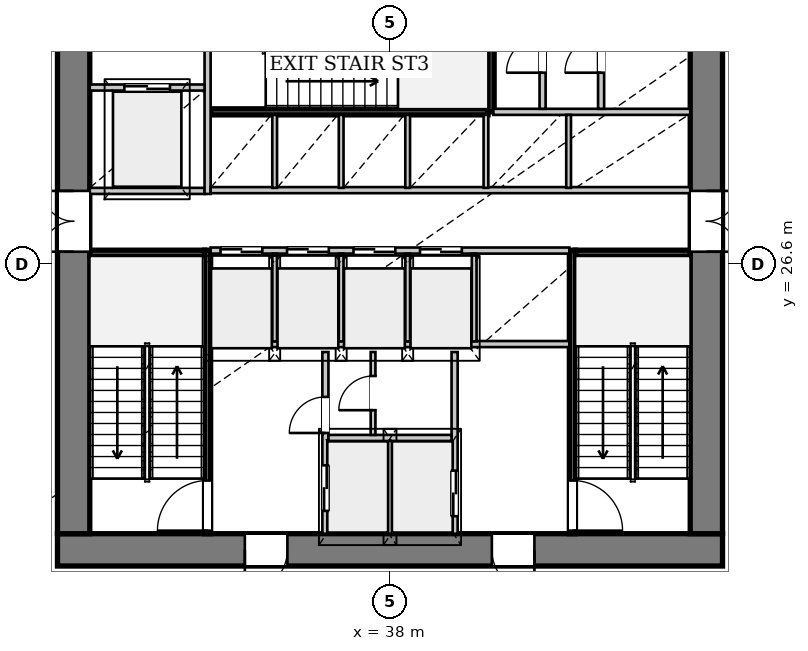
"""IFC4 building model, lengths in metres.
Left out: names, types, materials, properties, quantities, classifications, styles, units other than length and angle.
Written with IfcOpenShell. Run it as: python <this file> out.ifc"""

import sys

from ifc_helpers import new_model, si_unit, direction, frame, frame_2d, origin, place, context, subcontext, project, spatial, rectangle, extrude, source, transform, mapped, element, fill, save


model = new_model("IFC4")
c1 = context("Model", 3, precision=1e-05, world=origin(), true_north=direction((0.0, 1.0)))
c2 = subcontext(c1, "Body", "Model", "MODEL_VIEW")
j1 = project(units=[si_unit("LENGTHUNIT", "METRE"), si_unit("PLANEANGLEUNIT", "RADIAN")], contexts=[c1])
p1 = place(None, origin())
s1 = spatial("IfcSite", under=j1, at=p1, CompositionType="ELEMENT")
p2 = place(p1, origin())
s2 = spatial("IfcBuilding", under=s1, at=p2, CompositionType="ELEMENT")
p3 = place(p2, frame((0.0, 0.0, 15.6)))
s3 = spatial("IfcBuildingStorey", under=s2, at=p3, CompositionType="ELEMENT", Elevation=15.6)
p4 = place(p3, frame((46.75, 19.075, 0.0), z_axis=(0.0, 0.0, 1.0), x_axis=(-1.0, 0.0, 0.0)))
e1 = element("IfcWall", 1, at=p4, inside=s3, PredefinedType="SHEAR", context=c2, shape_type="SweptSolid", body=[
    extrude(rectangle(XDim=17.5, YDim=0.85, at=frame_2d((8.75, 0.0))), origin(), (0.0, 0.0, 1.0), 4.18),
])
p5 = place(p4, frame((4.95, 0.0, 0.0)))
e2 = element("IfcOpeningElement", 2, at=p5, cuts=e1, PredefinedType="OPENING", context=c2, shape_type="SweptSolid", body=[
    extrude(rectangle(XDim=1.12, YDim=2.25, at=frame_2d((0.56, 1.125))), frame((0.0, 0.435, 0.0), z_axis=(0.0, -1.0, 0.0), x_axis=(1.0, 0.0, 0.0)), (0.0, 0.0, 1.0), 0.87),
])
p6 = place(p4, frame((11.45, 0.0, 0.0)))
e3 = element("IfcOpeningElement", 3, at=p6, cuts=e1, PredefinedType="OPENING", context=c2, shape_type="SweptSolid", body=[
    extrude(rectangle(XDim=1.12, YDim=2.25, at=frame_2d((0.56, 1.125))), frame((0.0, 0.435, 0.0), z_axis=(0.0, -1.0, 0.0), x_axis=(1.0, 0.0, 0.0)), (0.0, 0.0, 1.0), 0.87),
])
p7 = place(p3, frame((29.675, 19.5, 0.0), z_axis=(0.0, 0.0, 1.0), x_axis=(0.0, 1.0, 0.0)))
e4 = element("IfcWall", 4, at=p7, inside=s3, PredefinedType="SHEAR", context=c2, shape_type="SweptSolid", body=[
    extrude(rectangle(XDim=14.2, YDim=0.85, at=frame_2d((7.1, 0.0))), origin(), (0.0, 0.0, 1.0), 4.18),
])
p8 = place(p7, frame((7.42, 0.0, 0.0)))
e5 = element("IfcOpeningElement", 5, at=p8, cuts=e4, PredefinedType="OPENING", context=c2, shape_type="SweptSolid", body=[
    extrude(rectangle(XDim=1.6, YDim=2.2, at=frame_2d((0.8, 1.1))), frame((0.0, 0.435, 0.0), z_axis=(0.0, -1.0, 0.0), x_axis=(1.0, 0.0, 0.0)), (0.0, 0.0, 1.0), 0.87),
])
p9 = place(p3, frame((46.325, 33.7, 0.0), z_axis=(0.0, 0.0, 1.0), x_axis=(0.0, -1.0, 0.0)))
e6 = element("IfcWall", 6, at=p9, inside=s3, PredefinedType="SHEAR", context=c2, shape_type="SweptSolid", body=[
    extrude(rectangle(XDim=14.2, YDim=0.85, at=frame_2d((7.1, 0.0))), origin(), (0.0, 0.0, 1.0), 4.18),
])
p10 = place(p9, frame((5.18, 0.0, 0.0)))
e7 = element("IfcOpeningElement", 7, at=p10, cuts=e6, PredefinedType="OPENING", context=c2, shape_type="SweptSolid", body=[
    extrude(rectangle(XDim=1.6, YDim=2.2, at=frame_2d((0.8, 1.1))), frame((0.0, 0.435, 0.0), z_axis=(0.0, -1.0, 0.0), x_axis=(1.0, 0.0, 0.0)), (0.0, 0.0, 1.0), 0.87),
])
p11 = place(p3, frame((33.2, 19.5, 0.0), z_axis=(0.0, 0.0, 1.0), x_axis=(0.0, 1.0, 0.0)))
e8 = element("IfcWall", 8, at=p11, inside=s3, PredefinedType="PARTITIONING", context=c2, shape_type="SweptSolid", body=[
    extrude(rectangle(XDim=7.46, YDim=0.16, at=frame_2d((3.73, 0.0))), origin(), (0.0, 0.0, 1.0), 4.18),
])
p12 = place(p11, frame((0.08, 0.0, 0.0)))
e9 = element("IfcOpeningElement", 9, at=p12, cuts=e8, PredefinedType="OPENING", context=c2, shape_type="SweptSolid", body=[
    extrude(rectangle(XDim=1.32, YDim=2.2, at=frame_2d((0.66, 1.1))), frame((0.0, 0.09, 0.0), z_axis=(0.0, -1.0, 0.0), x_axis=(1.0, 0.0, 0.0)), (0.0, 0.0, 1.0), 0.18),
])
p13 = place(p3, frame((30.1, 26.88, 0.0), z_axis=(0.0, 0.0, 1.0), x_axis=(1.0, 0.0, 0.0)))
e10 = element("IfcWall", 10, at=p13, inside=s3, PredefinedType="PARTITIONING", context=c2, shape_type="SweptSolid", body=[
    extrude(rectangle(XDim=3.02, YDim=0.16, at=frame_2d((1.51, 0.0))), origin(), (0.0, 0.0, 1.0), 4.18),
])
p14 = place(p3, frame((42.8, 26.96, 0.0), z_axis=(0.0, 0.0, 1.0), x_axis=(0.0, -1.0, 0.0)))
e11 = element("IfcWall", 11, at=p14, inside=s3, PredefinedType="PARTITIONING", context=c2, shape_type="SweptSolid", body=[
    extrude(rectangle(XDim=7.46, YDim=0.16, at=frame_2d((3.73, 0.0))), origin(), (0.0, 0.0, 1.0), 4.18),
])
p15 = place(p14, frame((6.06, 0.0, 0.0)))
e12 = element("IfcOpeningElement", 12, at=p15, cuts=e11, PredefinedType="OPENING", context=c2, shape_type="SweptSolid", body=[
    extrude(rectangle(XDim=1.32, YDim=2.2, at=frame_2d((0.66, 1.1))), frame((0.0, 0.09, 0.0), z_axis=(0.0, -1.0, 0.0), x_axis=(1.0, 0.0, 0.0)), (0.0, 0.0, 1.0), 0.18),
])
p16 = place(p3, frame((42.88, 26.88, 0.0), z_axis=(0.0, 0.0, 1.0), x_axis=(1.0, 0.0, 0.0)))
e13 = element("IfcWall", 13, at=p16, inside=s3, PredefinedType="PARTITIONING", context=c2, shape_type="SweptSolid", body=[
    extrude(rectangle(XDim=3.02, YDim=0.16, at=frame_2d((1.51, 0.0))), origin(), (0.0, 0.0, 1.0), 4.18),
])
p17 = place(p3, frame((33.28, 30.6, 0.0), z_axis=(0.0, 0.0, 1.0), x_axis=(1.0, 0.0, 0.0)))
e14 = element("IfcWall", 14, at=p17, inside=s3, PredefinedType="PARTITIONING", context=c2, shape_type="SweptSolid", body=[
    extrude(rectangle(XDim=7.3, YDim=0.16, at=frame_2d((3.65, 0.0))), origin(), (0.0, 0.0, 1.0), 4.18),
])
p18 = place(p3, frame((40.66, 30.6, 0.0), z_axis=(0.0, 0.0, 1.0), x_axis=(0.0, 1.0, 0.0)))
e15 = element("IfcWall", 15, at=p18, inside=s3, PredefinedType="PARTITIONING", context=c2, shape_type="SweptSolid", body=[
    extrude(rectangle(XDim=3.1, YDim=0.16, at=frame_2d((1.55, 0.0))), origin(), (0.0, 0.0, 1.0), 4.18),
])
p19 = place(p3, frame((36.3, 19.5, 0.0), z_axis=(0.0, 0.0, 1.0), x_axis=(0.0, 1.0, 0.0)))
e16 = element("IfcWall", 16, at=p19, inside=s3, PredefinedType="PARTITIONING", context=c2, shape_type="SweptSolid", body=[
    extrude(rectangle(XDim=4.78, YDim=0.16, at=frame_2d((2.39, 0.0))), origin(), (0.0, 0.0, 1.0), 4.18),
])
p20 = place(p19, frame((0.6, 0.0, 0.0)))
e17 = element("IfcOpeningElement", 17, at=p20, cuts=e16, PredefinedType="OPENING", context=c2, shape_type="SweptSolid", body=[
    extrude(rectangle(XDim=1.2, YDim=2.2, at=frame_2d((0.6, 1.1))), frame((0.0, 0.09, 0.0), z_axis=(0.0, -1.0, 0.0), x_axis=(1.0, 0.0, 0.0)), (0.0, 0.0, 1.0), 0.18),
])
p21 = place(p19, frame((2.65, 0.0, 0.0)))
e18 = element("IfcOpeningElement", 18, at=p21, cuts=e16, PredefinedType="OPENING", context=c2, shape_type="SweptSolid", body=[
    extrude(rectangle(XDim=0.95, YDim=2.1, at=frame_2d((0.475, 1.05))), frame((0.0, 0.09, 0.0), z_axis=(0.0, -1.0, 0.0), x_axis=(1.0, 0.0, 0.0)), (0.0, 0.0, 1.0), 0.18),
])
p22 = place(p3, frame((39.7, 24.28, 0.0), z_axis=(0.0, 0.0, 1.0), x_axis=(0.0, -1.0, 0.0)))
e19 = element("IfcWall", 19, at=p22, inside=s3, PredefinedType="PARTITIONING", context=c2, shape_type="SweptSolid", body=[
    extrude(rectangle(XDim=4.78, YDim=0.16, at=frame_2d((2.39, 0.0))), origin(), (0.0, 0.0, 1.0), 4.18),
])
p23 = place(p22, frame((3.12, 0.0, 0.0)))
e20 = element("IfcOpeningElement", 20, at=p23, cuts=e19, PredefinedType="OPENING", context=c2, shape_type="SweptSolid", body=[
    extrude(rectangle(XDim=1.2, YDim=2.2, at=frame_2d((0.6, 1.1))), frame((0.0, 0.09, 0.0), z_axis=(0.0, -1.0, 0.0), x_axis=(1.0, 0.0, 0.0)), (0.0, 0.0, 1.0), 0.18),
])
p24 = place(p3, frame((38.0, 19.5, 0.0), z_axis=(0.0, 0.0, 1.0), x_axis=(0.0, 1.0, 0.0)))
e21 = element("IfcWall", 21, at=p24, inside=s3, PredefinedType="PARTITIONING", context=c2, shape_type="SweptSolid", body=[
    extrude(rectangle(XDim=2.46, YDim=0.125, at=frame_2d((1.23, 0.0))), origin(), (0.0, 0.0, 1.0), 4.18),
])
p25 = place(p3, frame((36.38, 22.02, 0.0), z_axis=(0.0, 0.0, 1.0), x_axis=(1.0, 0.0, 0.0)))
e22 = element("IfcWall", 22, at=p25, inside=s3, PredefinedType="PARTITIONING", context=c2, shape_type="SweptSolid", body=[
    extrude(rectangle(XDim=3.24, YDim=0.16, at=frame_2d((1.62, 0.0))), origin(), (0.0, 0.0, 1.0), 4.18),
])
p26 = place(p3, frame((33.28, 24.49, 0.0), z_axis=(0.0, 0.0, 1.0), x_axis=(1.0, 0.0, 0.0)))
e23 = element("IfcWall", 23, at=p26, inside=s3, PredefinedType="PARTITIONING", context=c2, shape_type="SweptSolid", body=[
    extrude(rectangle(XDim=9.44, YDim=0.16, at=frame_2d((4.72, 0.0))), origin(), (0.0, 0.0, 1.0), 4.18),
])
p27 = place(p3, frame((37.554, 22.1, 0.0), z_axis=(0.0, 0.0, 1.0), x_axis=(0.0, 1.0, 0.0)))
e24 = element("IfcWall", 24, at=p27, inside=s3, PredefinedType="PARTITIONING", context=c2, shape_type="SweptSolid", body=[
    extrude(rectangle(XDim=2.18, YDim=0.125, at=frame_2d((1.09, 0.0))), origin(), (0.0, 0.0, 1.0), 4.18),
])
p28 = place(p27, frame((0.65, 0.0, 0.0)))
e25 = element("IfcOpeningElement", 25, at=p28, cuts=e24, PredefinedType="OPENING", context=c2, shape_type="SweptSolid", body=[
    extrude(rectangle(XDim=0.9, YDim=2.1, at=frame_2d((0.45, 1.05))), frame((0.0, 0.073, 0.0), z_axis=(0.0, -1.0, 0.0), x_axis=(1.0, 0.0, 0.0)), (0.0, 0.0, 1.0), 0.145),
])
p29 = place(p3, frame((30.1, 28.52, 0.0), z_axis=(0.0, 0.0, 1.0), x_axis=(1.0, 0.0, 0.0)))
e26 = element("IfcWall", 26, at=p29, inside=s3, PredefinedType="PARTITIONING", context=c2, shape_type="SweptSolid", body=[
    extrude(rectangle(XDim=3.02, YDim=0.16, at=frame_2d((1.51, 0.0))), origin(), (0.0, 0.0, 1.0), 4.18),
])
p30 = place(p3, frame((33.2, 28.44, 0.0), z_axis=(0.0, 0.0, 1.0), x_axis=(0.0, 1.0, 0.0)))
e27 = element("IfcWall", 27, at=p30, inside=s3, PredefinedType="PARTITIONING", context=c2, shape_type="SweptSolid", body=[
    extrude(rectangle(XDim=5.26, YDim=0.16, at=frame_2d((2.63, 0.0))), origin(), (0.0, 0.0, 1.0), 4.18),
])
p31 = place(p3, frame((30.1, 31.24, 0.0), z_axis=(0.0, 0.0, 1.0), x_axis=(1.0, 0.0, 0.0)))
e28 = element("IfcWall", 28, at=p31, inside=s3, PredefinedType="PARTITIONING", context=c2, shape_type="SweptSolid", body=[
    extrude(rectangle(XDim=3.02, YDim=0.16, at=frame_2d((1.51, 0.0))), origin(), (0.0, 0.0, 1.0), 4.18),
])
p32 = place(p31, frame((0.91, 0.0, 0.0)))
e29 = element("IfcOpeningElement", 29, at=p32, cuts=e28, PredefinedType="OPENING", context=c2, shape_type="SweptSolid", body=[
    extrude(rectangle(XDim=1.2, YDim=2.2, at=frame_2d((0.6, 1.1))), frame((0.0, 0.09, 0.0), z_axis=(0.0, -1.0, 0.0), x_axis=(1.0, 0.0, 0.0)), (0.0, 0.0, 1.0), 0.18),
])
p33 = place(p3, frame((33.28, 26.95, 0.0), z_axis=(0.0, 0.0, 1.0), x_axis=(1.0, 0.0, 0.0)))
e30 = element("IfcWall", 30, at=p33, inside=s3, PredefinedType="PARTITIONING", context=c2, shape_type="SweptSolid", body=[
    extrude(rectangle(XDim=9.44, YDim=0.16, at=frame_2d((4.72, 0.0))), origin(), (0.0, 0.0, 1.0), 4.18),
])
p34 = place(p33, frame((0.26, 0.0, 0.0)))
e31 = element("IfcOpeningElement", 31, at=p34, cuts=e30, PredefinedType="OPENING", context=c2, shape_type="SweptSolid", body=[
    extrude(rectangle(XDim=1.1, YDim=2.2, at=frame_2d((0.55, 1.1))), frame((0.0, 0.09, 0.0), z_axis=(0.0, -1.0, 0.0), x_axis=(1.0, 0.0, 0.0)), (0.0, 0.0, 1.0), 0.18),
])
p35 = place(p33, frame((2.01, 0.0, 0.0)))
e32 = element("IfcOpeningElement", 32, at=p35, cuts=e30, PredefinedType="OPENING", context=c2, shape_type="SweptSolid", body=[
    extrude(rectangle(XDim=1.1, YDim=2.2, at=frame_2d((0.55, 1.1))), frame((0.0, 0.09, 0.0), z_axis=(0.0, -1.0, 0.0), x_axis=(1.0, 0.0, 0.0)), (0.0, 0.0, 1.0), 0.18),
])
p36 = place(p33, frame((3.76, 0.0, 0.0)))
e33 = element("IfcOpeningElement", 33, at=p36, cuts=e30, PredefinedType="OPENING", context=c2, shape_type="SweptSolid", body=[
    extrude(rectangle(XDim=1.1, YDim=2.2, at=frame_2d((0.55, 1.1))), frame((0.0, 0.09, 0.0), z_axis=(0.0, -1.0, 0.0), x_axis=(1.0, 0.0, 0.0)), (0.0, 0.0, 1.0), 0.18),
])
p37 = place(p33, frame((5.51, 0.0, 0.0)))
e34 = element("IfcOpeningElement", 34, at=p37, cuts=e30, PredefinedType="OPENING", context=c2, shape_type="SweptSolid", body=[
    extrude(rectangle(XDim=1.1, YDim=2.2, at=frame_2d((0.55, 1.1))), frame((0.0, 0.09, 0.0), z_axis=(0.0, -1.0, 0.0), x_axis=(1.0, 0.0, 0.0)), (0.0, 0.0, 1.0), 0.18),
])
for number, where, z_axis, x_axis in (
    (35, (34.965, 24.56, 0.0), (0.0, 0.0, 1.0), (0.0, 1.0, 0.0)),
    (36, (36.715, 24.56, 0.0), (0.0, 0.0, 1.0), (0.0, 1.0, 0.0)),
    (37, (38.465, 24.56, 0.0), (0.0, 0.0, 1.0), (0.0, 1.0, 0.0)),
    (38, (40.215, 24.56, 0.0), (0.0, 0.0, 1.0), (0.0, 1.0, 0.0)),
):
    element("IfcWall", number, at=place(p3, frame(where, z_axis=z_axis, x_axis=x_axis)), inside=s3, PredefinedType="PARTITIONING", context=c2, shape_type="SweptSolid", body=[
        extrude(rectangle(XDim=2.31, YDim=0.125, at=frame_2d((1.155, 0.0))), origin(), (0.0, 0.0, 1.0), 4.18),
    ])
p38 = place(p3, frame((33.28, 28.54, 0.0), z_axis=(0.0, 0.0, 1.0), x_axis=(1.0, 0.0, 0.0)))
e39 = element("IfcWall", 39, at=p38, inside=s3, PredefinedType="PARTITIONING", context=c2, shape_type="SweptSolid", body=[
    extrude(rectangle(XDim=12.62, YDim=0.16, at=frame_2d((6.31, 0.0))), origin(), (0.0, 0.0, 1.0), 4.18),
])
p39 = place(p3, frame((40.72, 30.6, 0.0), z_axis=(0.0, 0.0, 1.0), x_axis=(1.0, 0.0, 0.0)))
e40 = element("IfcWall", 40, at=p39, inside=s3, PredefinedType="PARTITIONING", context=c2, shape_type="SweptSolid", body=[
    extrude(rectangle(XDim=5.18, YDim=0.16, at=frame_2d((2.59, 0.0))), origin(), (0.0, 0.0, 1.0), 4.18),
])
for number, where, z_axis, x_axis in (
    (41, (34.965, 28.6, 0.0), (0.0, 0.0, 1.0), (0.0, 1.0, 0.0)),
    (42, (36.715, 28.6, 0.0), (0.0, 0.0, 1.0), (0.0, 1.0, 0.0)),
    (43, (38.465, 28.6, 0.0), (0.0, 0.0, 1.0), (0.0, 1.0, 0.0)),
    (44, (40.525, 28.6, 0.0), (0.0, 0.0, 1.0), (0.0, 1.0, 0.0)),
    (45, (42.7, 28.6, 0.0), (0.0, 0.0, 1.0), (0.0, 1.0, 0.0)),
):
    element("IfcWall", number, at=place(p3, frame(where, z_axis=z_axis, x_axis=x_axis)), inside=s3, PredefinedType="PARTITIONING", context=c2, shape_type="SweptSolid", body=[
        extrude(rectangle(XDim=1.92, YDim=0.125, at=frame_2d((0.96, 0.0))), origin(), (0.0, 0.0, 1.0), 4.18),
    ])
p40 = place(p3, frame((42.015, 30.68, 0.0), z_axis=(0.0, 0.0, 1.0), x_axis=(0.0, 1.0, 0.0)))
e46 = element("IfcWall", 46, at=p40, inside=s3, PredefinedType="PARTITIONING", context=c2, shape_type="SweptSolid", body=[
    extrude(rectangle(XDim=3.02, YDim=0.16, at=frame_2d((1.51, 0.0))), origin(), (0.0, 0.0, 1.0), 4.18),
])
p41 = place(p40, frame((0.95, 0.0, 0.0)))
e47 = element("IfcOpeningElement", 47, at=p41, cuts=e46, PredefinedType="OPENING", context=c2, shape_type="SweptSolid", body=[
    extrude(rectangle(XDim=0.95, YDim=2.1, at=frame_2d((0.475, 1.05))), frame((0.0, 0.09, 0.0), z_axis=(0.0, -1.0, 0.0), x_axis=(1.0, 0.0, 0.0)), (0.0, 0.0, 1.0), 0.18),
])
p42 = place(p3, frame((43.555, 30.68, 0.0), z_axis=(0.0, 0.0, 1.0), x_axis=(0.0, 1.0, 0.0)))
e48 = element("IfcWall", 48, at=p42, inside=s3, PredefinedType="PARTITIONING", context=c2, shape_type="SweptSolid", body=[
    extrude(rectangle(XDim=3.02, YDim=0.16, at=frame_2d((1.51, 0.0))), origin(), (0.0, 0.0, 1.0), 4.18),
])
p43 = place(p42, frame((0.95, 0.0, 0.0)))
e49 = element("IfcOpeningElement", 49, at=p43, cuts=e48, PredefinedType="OPENING", context=c2, shape_type="SweptSolid", body=[
    extrude(rectangle(XDim=0.95, YDim=2.1, at=frame_2d((0.475, 1.05))), frame((0.0, 0.09, 0.0), z_axis=(0.0, -1.0, 0.0), x_axis=(1.0, 0.0, 0.0)), (0.0, 0.0, 1.0), 0.18),
])
m1 = source(origin(), c2, "Body", "SweptSolid", [
    extrude(rectangle(XDim=1.12, YDim=2.25, at=frame_2d((0.56, 1.125))), frame((0.0, 0.025, 0.0), z_axis=(0.0, -1.0, 0.0), x_axis=(1.0, 0.0, 0.0)), (0.0, 0.0, 1.0), 0.05),
])
p44 = place(p5, origin())
e50 = element("IfcDoor", 50, at=p44, inside=s3, OperationType="SINGLE_SWING_LEFT", PredefinedType="DOOR", context=c2, shape_type="MappedRepresentation", body=[
    mapped(m1, transform((0.0, 0.0, 0.0), x_axis=(1.0, 0.0, 0.0), y_axis=(0.0, 1.0, 0.0), z_axis=(0.0, 0.0, 1.0), scale=1.0)),
])
fill(e2, e50)
p45 = place(p6, origin())
e51 = element("IfcDoor", 51, at=p45, inside=s3, OperationType="SINGLE_SWING_RIGHT", PredefinedType="DOOR", context=c2, shape_type="MappedRepresentation", body=[
    mapped(m1, transform((0.0, 0.0, 0.0), x_axis=(1.0, 0.0, 0.0), y_axis=(0.0, 1.0, 0.0), z_axis=(0.0, 0.0, 1.0), scale=1.0)),
])
fill(e3, e51)
m2 = source(origin(), c2, "Body", "SweptSolid", [
    extrude(rectangle(XDim=1.6, YDim=2.2, at=frame_2d((0.8, 1.1))), frame((0.0, 0.025, 0.0), z_axis=(0.0, -1.0, 0.0), x_axis=(1.0, 0.0, 0.0)), (0.0, 0.0, 1.0), 0.05),
])
p46 = place(p8, origin())
e52 = element("IfcDoor", 52, at=p46, inside=s3, OperationType="DOUBLE_DOOR_SINGLE_SWING", PredefinedType="DOOR", context=c2, shape_type="MappedRepresentation", body=[
    mapped(m2, transform((0.0, 0.0, 0.0), x_axis=(1.0, 0.0, 0.0), y_axis=(0.0, 1.0, 0.0), z_axis=(0.0, 0.0, 1.0), scale=1.0)),
])
fill(e5, e52)
p47 = place(p10, origin())
e53 = element("IfcDoor", 53, at=p47, inside=s3, OperationType="DOUBLE_DOOR_SINGLE_SWING", PredefinedType="DOOR", context=c2, shape_type="MappedRepresentation", body=[
    mapped(m2, transform((0.0, 0.0, 0.0), x_axis=(1.0, 0.0, 0.0), y_axis=(0.0, 1.0, 0.0), z_axis=(0.0, 0.0, 1.0), scale=1.0)),
])
fill(e7, e53)
m3 = source(origin(), c2, "Body", "SweptSolid", [
    extrude(rectangle(XDim=1.32, YDim=2.2, at=frame_2d((0.66, 1.1))), frame((0.0, 0.025, 0.0), z_axis=(0.0, -1.0, 0.0), x_axis=(1.0, 0.0, 0.0)), (0.0, 0.0, 1.0), 0.05),
])
p48 = place(p12, origin())
e54 = element("IfcDoor", 54, at=p48, inside=s3, OperationType="SINGLE_SWING_LEFT", PredefinedType="DOOR", context=c2, shape_type="MappedRepresentation", body=[
    mapped(m3, transform((0.0, 0.0, 0.0), x_axis=(1.0, 0.0, 0.0), y_axis=(0.0, 1.0, 0.0), z_axis=(0.0, 0.0, 1.0), scale=1.0)),
])
fill(e9, e54)
p49 = place(p15, origin())
e55 = element("IfcDoor", 55, at=p49, inside=s3, OperationType="SINGLE_SWING_RIGHT", PredefinedType="DOOR", context=c2, shape_type="MappedRepresentation", body=[
    mapped(m3, transform((0.0, 0.0, 0.0), x_axis=(1.0, 0.0, 0.0), y_axis=(0.0, 1.0, 0.0), z_axis=(0.0, 0.0, 1.0), scale=1.0)),
])
fill(e12, e55)
m4 = source(origin(), c2, "Body", "SweptSolid", [
    extrude(rectangle(XDim=1.2, YDim=2.2, at=frame_2d((0.6, 1.1))), frame((0.0, 0.025, 0.0), z_axis=(0.0, -1.0, 0.0), x_axis=(1.0, 0.0, 0.0)), (0.0, 0.0, 1.0), 0.05),
])
p50 = place(p20, origin())
e56 = element("IfcDoor", 56, at=p50, inside=s3, OperationType="DOUBLE_DOOR_SLIDING", PredefinedType="DOOR", context=c2, shape_type="MappedRepresentation", body=[
    mapped(m4, transform((0.0, 0.0, 0.0), x_axis=(1.0, 0.0, 0.0), y_axis=(0.0, 1.0, 0.0), z_axis=(0.0, 0.0, 1.0), scale=1.0)),
])
fill(e17, e56)
m5 = source(origin(), c2, "Body", "SweptSolid", [
    extrude(rectangle(XDim=0.95, YDim=2.1, at=frame_2d((0.475, 1.05))), frame((0.0, 0.025, 0.0), z_axis=(0.0, -1.0, 0.0), x_axis=(1.0, 0.0, 0.0)), (0.0, 0.0, 1.0), 0.05),
])
p51 = place(p21, origin())
e57 = element("IfcDoor", 57, at=p51, inside=s3, OperationType="SINGLE_SWING_LEFT", PredefinedType="DOOR", context=c2, shape_type="MappedRepresentation", body=[
    mapped(m5, transform((0.0, 0.0, 0.0), x_axis=(1.0, 0.0, 0.0), y_axis=(0.0, 1.0, 0.0), z_axis=(0.0, 0.0, 1.0), scale=1.0)),
])
fill(e18, e57)
m6 = source(origin(), c2, "Body", "SweptSolid", [
    extrude(rectangle(XDim=0.9, YDim=2.1, at=frame_2d((0.45, 1.05))), frame((0.0, 0.025, 0.0), z_axis=(0.0, -1.0, 0.0), x_axis=(1.0, 0.0, 0.0)), (0.0, 0.0, 1.0), 0.05),
])
p52 = place(p28, origin())
e58 = element("IfcDoor", 58, at=p52, inside=s3, OperationType="SINGLE_SWING_LEFT", PredefinedType="DOOR", context=c2, shape_type="MappedRepresentation", body=[
    mapped(m6, transform((0.0, 0.0, 0.0), x_axis=(1.0, 0.0, 0.0), y_axis=(0.0, 1.0, 0.0), z_axis=(0.0, 0.0, 1.0), scale=1.0)),
])
fill(e25, e58)
p53 = place(p23, origin())
e59 = element("IfcDoor", 59, at=p53, inside=s3, OperationType="DOUBLE_DOOR_SLIDING", PredefinedType="DOOR", context=c2, shape_type="MappedRepresentation", body=[
    mapped(m4, transform((0.0, 0.0, 0.0), x_axis=(1.0, 0.0, 0.0), y_axis=(0.0, 1.0, 0.0), z_axis=(0.0, 0.0, 1.0), scale=1.0)),
])
fill(e20, e59)
p54 = place(p32, origin())
e60 = element("IfcDoor", 60, at=p54, inside=s3, OperationType="DOUBLE_DOOR_SLIDING", PredefinedType="DOOR", context=c2, shape_type="MappedRepresentation", body=[
    mapped(m4, transform((0.0, 0.0, 0.0), x_axis=(1.0, 0.0, 0.0), y_axis=(0.0, 1.0, 0.0), z_axis=(0.0, 0.0, 1.0), scale=1.0)),
])
fill(e29, e60)
m7 = source(origin(), c2, "Body", "SweptSolid", [
    extrude(rectangle(XDim=1.1, YDim=2.2, at=frame_2d((0.55, 1.1))), frame((0.0, 0.025, 0.0), z_axis=(0.0, -1.0, 0.0), x_axis=(1.0, 0.0, 0.0)), (0.0, 0.0, 1.0), 0.05),
])
p55 = place(p34, origin())
e61 = element("IfcDoor", 61, at=p55, inside=s3, OperationType="DOUBLE_DOOR_SLIDING", PredefinedType="DOOR", context=c2, shape_type="MappedRepresentation", body=[
    mapped(m7, transform((0.0, 0.0, 0.0), x_axis=(1.0, 0.0, 0.0), y_axis=(0.0, 1.0, 0.0), z_axis=(0.0, 0.0, 1.0), scale=1.0)),
])
fill(e31, e61)
p56 = place(p35, origin())
e62 = element("IfcDoor", 62, at=p56, inside=s3, OperationType="DOUBLE_DOOR_SLIDING", PredefinedType="DOOR", context=c2, shape_type="MappedRepresentation", body=[
    mapped(m7, transform((0.0, 0.0, 0.0), x_axis=(1.0, 0.0, 0.0), y_axis=(0.0, 1.0, 0.0), z_axis=(0.0, 0.0, 1.0), scale=1.0)),
])
fill(e32, e62)
p57 = place(p36, origin())
e63 = element("IfcDoor", 63, at=p57, inside=s3, OperationType="DOUBLE_DOOR_SLIDING", PredefinedType="DOOR", context=c2, shape_type="MappedRepresentation", body=[
    mapped(m7, transform((0.0, 0.0, 0.0), x_axis=(1.0, 0.0, 0.0), y_axis=(0.0, 1.0, 0.0), z_axis=(0.0, 0.0, 1.0), scale=1.0)),
])
fill(e33, e63)
p58 = place(p37, origin())
e64 = element("IfcDoor", 64, at=p58, inside=s3, OperationType="DOUBLE_DOOR_SLIDING", PredefinedType="DOOR", context=c2, shape_type="MappedRepresentation", body=[
    mapped(m7, transform((0.0, 0.0, 0.0), x_axis=(1.0, 0.0, 0.0), y_axis=(0.0, 1.0, 0.0), z_axis=(0.0, 0.0, 1.0), scale=1.0)),
])
fill(e34, e64)
p59 = place(p41, origin())
e65 = element("IfcDoor", 65, at=p59, inside=s3, OperationType="SINGLE_SWING_LEFT", PredefinedType="DOOR", context=c2, shape_type="MappedRepresentation", body=[
    mapped(m5, transform((0.0, 0.0, 0.0), x_axis=(1.0, 0.0, 0.0), y_axis=(0.0, 1.0, 0.0), z_axis=(0.0, 0.0, 1.0), scale=1.0)),
])
fill(e47, e65)
p60 = place(p43, origin())
e66 = element("IfcDoor", 66, at=p60, inside=s3, OperationType="SINGLE_SWING_LEFT", PredefinedType="DOOR", context=c2, shape_type="MappedRepresentation", body=[
    mapped(m5, transform((0.0, 0.0, 0.0), x_axis=(1.0, 0.0, 0.0), y_axis=(0.0, 1.0, 0.0), z_axis=(0.0, 0.0, 1.0), scale=1.0)),
])
fill(e49, e66)
save(model, sys.argv[1])
